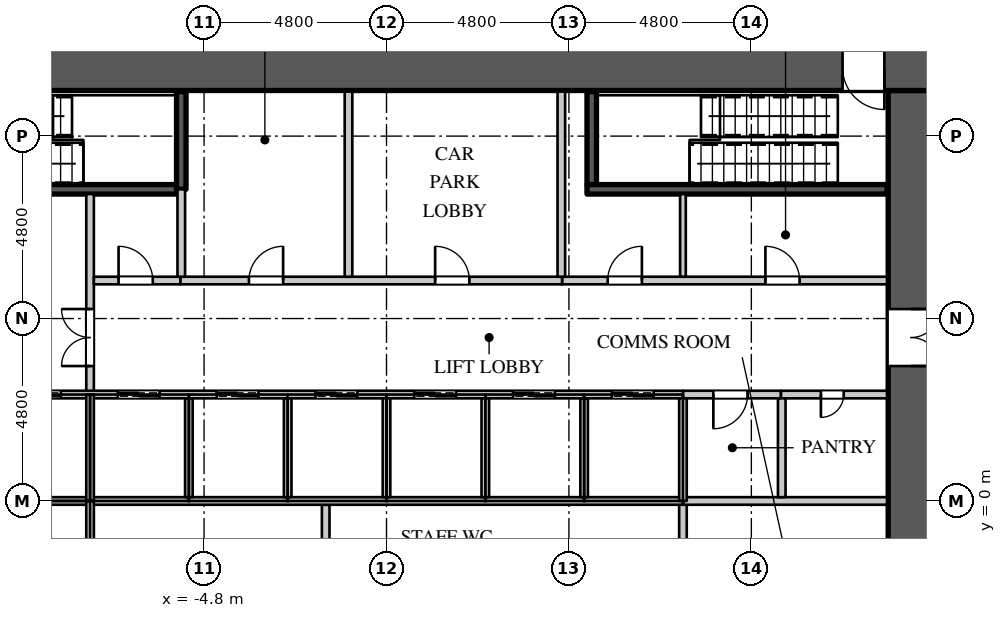
"""IFC4 building model, lengths in metres.
Left out: names, types, materials, properties, quantities, classifications, styles, units other than length and angle.
Written with IfcOpenShell. Run it as: python <this file> out.ifc"""

import sys

from ifc_helpers import new_model, si_unit, direction, frame, frame_2d, origin, place, context, subcontext, project, spatial, rectangle, extrude, element, fill, save


model = new_model("IFC4")
c1 = context("Model", 3, precision=1e-05, world=origin(), true_north=direction((0.0, 1.0)))
c2 = subcontext(c1, "Body", "Model", "MODEL_VIEW")
j1 = project(units=[si_unit("LENGTHUNIT", "METRE"), si_unit("PLANEANGLEUNIT", "RADIAN")], contexts=[c1])
p1 = place(None, origin())
s1 = spatial("IfcSite", under=j1, at=p1, CompositionType="ELEMENT")
p2 = place(p1, origin())
s2 = spatial("IfcBuilding", under=s1, at=p2, CompositionType="ELEMENT")
p3 = place(p2, frame((0.0, 0.0, -9.0)))
s3 = spatial("IfcBuildingStorey", under=s2, at=p3, CompositionType="ELEMENT", Elevation=-9.0)
p4 = place(p3, frame((-14.4, 11.4, 0.0), z_axis=(0.0, 0.0, 1.0), x_axis=(1.0, 0.0, 0.0)))
e1 = element("IfcWall", 1, at=p4, inside=s3, PredefinedType="SHEAR", context=c2, shape_type="SweptSolid", body=[
    extrude(rectangle(XDim=28.8, YDim=1.2, at=frame_2d((14.4, 0.0))), origin(), (0.0, 0.0, 1.0), 4.5),
])
p5 = place(p4, frame((1.3, 0.0, 0.0)))
e2 = element("IfcOpeningElement", 2, at=p5, cuts=e1, PredefinedType="OPENING", context=c2, shape_type="SweptSolid", body=[
    extrude(rectangle(XDim=1.1, YDim=2.2, at=frame_2d((0.55, 1.1))), frame((0.0, 0.61, 0.0), z_axis=(0.0, -1.0, 0.0), x_axis=(1.0, 0.0, 0.0)), (0.0, 0.0, 1.0), 1.22),
])
p6 = place(p4, frame((26.4, 0.0, 0.0)))
e3 = element("IfcOpeningElement", 3, at=p6, cuts=e1, PredefinedType="OPENING", context=c2, shape_type="SweptSolid", body=[
    extrude(rectangle(XDim=1.1, YDim=2.2, at=frame_2d((0.55, 1.1))), frame((0.0, 0.61, 0.0), z_axis=(0.0, -1.0, 0.0), x_axis=(1.0, 0.0, 0.0)), (0.0, 0.0, 1.0), 1.22),
])
p7 = place(p3, frame((13.8, -10.8, 0.0), z_axis=(0.0, 0.0, 1.0), x_axis=(0.0, 1.0, 0.0)))
e4 = element("IfcWall", 4, at=p7, inside=s3, PredefinedType="SHEAR", context=c2, shape_type="SweptSolid", body=[
    extrude(rectangle(XDim=21.6, YDim=1.2, at=frame_2d((10.8, 0.0))), origin(), (0.0, 0.0, 1.0), 4.5),
])
p8 = place(p7, frame((14.35, 0.0, 0.0)))
e5 = element("IfcOpeningElement", 5, at=p8, cuts=e4, PredefinedType="OPENING", context=c2, shape_type="SweptSolid", body=[
    extrude(rectangle(XDim=1.5, YDim=2.4, at=frame_2d((0.75, 1.2))), frame((0.0, 0.61, 0.0), z_axis=(0.0, -1.0, 0.0), x_axis=(1.0, 0.0, 0.0)), (0.0, 0.0, 1.0), 1.22),
])
p9 = place(p3, frame((-7.8, 2.8, 0.0), z_axis=(0.0, 0.0, 1.0), x_axis=(0.0, 1.0, 0.0)))
e6 = element("IfcWall", 6, at=p9, inside=s3, PredefinedType="PARTITIONING", context=c2, shape_type="SweptSolid", body=[
    extrude(rectangle(XDim=5.275, YDim=0.2, at=frame_2d((2.637, 0.0))), origin(), (0.0, 0.0, 1.0), 4.048),
])
p10 = place(p9, frame((0.75, 0.0, 0.0)))
e7 = element("IfcOpeningElement", 7, at=p10, cuts=e6, PredefinedType="OPENING", context=c2, shape_type="SweptSolid", body=[
    extrude(rectangle(XDim=1.5, YDim=2.4, at=frame_2d((0.75, 1.2))), frame((0.0, 0.11, 0.0), z_axis=(0.0, -1.0, 0.0), x_axis=(1.0, 0.0, 0.0)), (0.0, 0.0, 1.0), 0.22),
])
p11 = place(p3, frame((-7.7, 5.8, 0.0), z_axis=(0.0, 0.0, 1.0), x_axis=(1.0, 0.0, 0.0)))
e8 = element("IfcWall", 8, at=p11, inside=s3, PredefinedType="PARTITIONING", context=c2, shape_type="SweptSolid", body=[
    extrude(rectangle(XDim=2.28, YDim=0.2, at=frame_2d((1.14, 0.0))), origin(), (0.0, 0.0, 1.0), 4.048),
])
p12 = place(p11, frame((0.65, 0.0, 0.0)))
e9 = element("IfcOpeningElement", 9, at=p12, cuts=e8, PredefinedType="OPENING", context=c2, shape_type="SweptSolid", body=[
    extrude(rectangle(XDim=0.9, YDim=2.2, at=frame_2d((0.45, 1.1))), frame((0.0, 0.11, 0.0), z_axis=(0.0, -1.0, 0.0), x_axis=(1.0, 0.0, 0.0)), (0.0, 0.0, 1.0), 0.22),
])
p13 = place(p3, frame((4.62, 5.8, 0.0), z_axis=(0.0, 0.0, 1.0), x_axis=(1.0, 0.0, 0.0)))
e10 = element("IfcWall", 10, at=p13, inside=s3, PredefinedType="PARTITIONING", context=c2, shape_type="SweptSolid", body=[
    extrude(rectangle(XDim=8.55, YDim=0.2, at=frame_2d((4.275, 0.0))), origin(), (0.0, 0.0, 1.0), 4.048),
])
p14 = place(p13, frame((1.2, 0.0, 0.0)))
e11 = element("IfcOpeningElement", 11, at=p14, cuts=e10, PredefinedType="OPENING", context=c2, shape_type="SweptSolid", body=[
    extrude(rectangle(XDim=0.9, YDim=2.2, at=frame_2d((0.45, 1.1))), frame((0.0, 0.11, 0.0), z_axis=(0.0, -1.0, 0.0), x_axis=(1.0, 0.0, 0.0)), (0.0, 0.0, 1.0), 0.22),
])
p15 = place(p13, frame((5.35, 0.0, 0.0)))
e12 = element("IfcOpeningElement", 12, at=p15, cuts=e10, PredefinedType="OPENING", context=c2, shape_type="SweptSolid", body=[
    extrude(rectangle(XDim=0.9, YDim=2.2, at=frame_2d((0.45, 1.1))), frame((0.0, 0.11, 0.0), z_axis=(0.0, -1.0, 0.0), x_axis=(1.0, 0.0, 0.0)), (0.0, 0.0, 1.0), 0.22),
])
p16 = place(p3, frame((7.8, 2.8, 0.0), z_axis=(0.0, 0.0, 1.0), x_axis=(1.0, 0.0, 0.0)))
e13 = element("IfcWall", 13, at=p16, inside=s3, PredefinedType="PARTITIONING", context=c2, shape_type="SweptSolid", body=[
    extrude(rectangle(XDim=2.58, YDim=0.2, at=frame_2d((1.29, 0.0))), origin(), (0.0, 0.0, 1.0), 4.048),
])
p17 = place(p16, frame((0.8, 0.0, 0.0)))
e14 = element("IfcOpeningElement", 14, at=p17, cuts=e13, PredefinedType="OPENING", context=c2, shape_type="SweptSolid", body=[
    extrude(rectangle(XDim=0.9, YDim=2.2, at=frame_2d((0.45, 1.1))), frame((0.0, 0.11, 0.0), z_axis=(0.0, -1.0, 0.0), x_axis=(1.0, 0.0, 0.0)), (0.0, 0.0, 1.0), 0.22),
])
p18 = place(p3, frame((7.8, 5.9, 0.0), z_axis=(0.0, 0.0, 1.0), x_axis=(0.0, 1.0, 0.0)))
e15 = element("IfcWall", 15, at=p18, inside=s3, PredefinedType="PARTITIONING", context=c2, shape_type="SweptSolid", body=[
    extrude(rectangle(XDim=2.175, YDim=0.15, at=frame_2d((1.087, 0.0))), origin(), (0.0, 0.0, 1.0), 4.048),
])
p19 = place(p3, frame((-5.42, 5.8, 0.0), z_axis=(0.0, 0.0, 1.0), x_axis=(1.0, 0.0, 0.0)))
e16 = element("IfcWall", 16, at=p19, inside=s3, PredefinedType="PARTITIONING", context=c2, shape_type="SweptSolid", body=[
    extrude(rectangle(XDim=10.04, YDim=0.2, at=frame_2d((5.02, 0.0))), origin(), (0.0, 0.0, 1.0), 4.048),
])
p20 = place(p19, frame((1.8, 0.0, 0.0)))
e17 = element("IfcOpeningElement", 17, at=p20, cuts=e16, PredefinedType="OPENING", context=c2, shape_type="SweptSolid", body=[
    extrude(rectangle(XDim=0.9, YDim=2.2, at=frame_2d((0.45, 1.1))), frame((0.0, 0.11, 0.0), z_axis=(0.0, -1.0, 0.0), x_axis=(1.0, 0.0, 0.0)), (0.0, 0.0, 1.0), 0.22),
])
p21 = place(p19, frame((6.7, 0.0, 0.0)))
e18 = element("IfcOpeningElement", 18, at=p21, cuts=e16, PredefinedType="OPENING", context=c2, shape_type="SweptSolid", body=[
    extrude(rectangle(XDim=0.9, YDim=2.2, at=frame_2d((0.45, 1.1))), frame((0.0, 0.11, 0.0), z_axis=(0.0, -1.0, 0.0), x_axis=(1.0, 0.0, 0.0)), (0.0, 0.0, 1.0), 0.22),
])
p22 = place(p3, frame((-5.4, 5.9, 0.0), z_axis=(0.0, 0.0, 1.0), x_axis=(0.0, 1.0, 0.0)))
e19 = element("IfcWall", 19, at=p22, inside=s3, PredefinedType="PARTITIONING", context=c2, shape_type="SweptSolid", body=[
    extrude(rectangle(XDim=2.3, YDim=0.2, at=frame_2d((1.15, 0.0))), origin(), (0.0, 0.0, 1.0), 4.048),
])
p23 = place(p3, frame((-1.6, -2.7, 0.0), z_axis=(0.0, 0.0, 1.0), x_axis=(0.0, 1.0, 0.0)))
e20 = element("IfcWall", 20, at=p23, inside=s3, PredefinedType="PARTITIONING", context=c2, shape_type="SweptSolid", body=[
    extrude(rectangle(XDim=2.6, YDim=0.2, at=frame_2d((1.3, 0.0))), origin(), (0.0, 0.0, 1.0), 4.048),
])
for number, where, z_axis, x_axis in (
    (21, (-1.0, 5.9, 0.0), (0.0, 0.0, 1.0), (0.0, 1.0, 0.0)),
    (22, (4.6, 5.9, 0.0), (0.0, 0.0, 1.0), (0.0, 1.0, 0.0)),
):
    element("IfcWall", number, at=place(p3, frame(where, z_axis=z_axis, x_axis=x_axis)), inside=s3, PredefinedType="PARTITIONING", context=c2, shape_type="SweptSolid", body=[
        extrude(rectangle(XDim=4.87, YDim=0.2, at=frame_2d((2.435, 0.0))), origin(), (0.0, 0.0, 1.0), 4.048),
    ])
p24 = place(p3, frame((7.8, -2.7, 0.0), z_axis=(0.0, 0.0, 1.0), x_axis=(0.0, 1.0, 0.0)))
e23 = element("IfcWall", 23, at=p24, inside=s3, PredefinedType="PARTITIONING", context=c2, shape_type="SweptSolid", body=[
    extrude(rectangle(XDim=2.7, YDim=0.2, at=frame_2d((1.35, 0.0))), origin(), (0.0, 0.0, 1.0), 4.048),
])
p25 = place(p3, frame((7.8, 0.0, 0.0), z_axis=(0.0, 0.0, 1.0), x_axis=(1.0, 0.0, 0.0)))
e24 = element("IfcWall", 24, at=p25, inside=s3, PredefinedType="PARTITIONING", context=c2, shape_type="SweptSolid", body=[
    extrude(rectangle(XDim=5.37, YDim=0.2, at=frame_2d((2.685, 0.0))), origin(), (0.0, 0.0, 1.0), 4.048),
])
p26 = place(p3, frame((10.38, 2.8, 0.0), z_axis=(0.0, 0.0, 1.0), x_axis=(1.0, 0.0, 0.0)))
e25 = element("IfcWall", 25, at=p26, inside=s3, PredefinedType="PARTITIONING", context=c2, shape_type="SweptSolid", body=[
    extrude(rectangle(XDim=2.79, YDim=0.2, at=frame_2d((1.395, 0.0))), origin(), (0.0, 0.0, 1.0), 4.048),
])
p27 = place(p26, frame((1.05, 0.0, 0.0)))
e26 = element("IfcOpeningElement", 26, at=p27, cuts=e25, PredefinedType="OPENING", context=c2, shape_type="SweptSolid", body=[
    extrude(rectangle(XDim=0.6, YDim=2.0, at=frame_2d((0.3, 1.0))), frame((0.0, 0.11, 0.0), z_axis=(0.0, -1.0, 0.0), x_axis=(1.0, 0.0, 0.0)), (0.0, 0.0, 1.0), 0.22),
])
p28 = place(p3, frame((10.4, 0.1, 0.0), z_axis=(0.0, 0.0, 1.0), x_axis=(0.0, 1.0, 0.0)))
e27 = element("IfcWall", 27, at=p28, inside=s3, PredefinedType="PARTITIONING", context=c2, shape_type="SweptSolid", body=[
    extrude(rectangle(XDim=2.6, YDim=0.2, at=frame_2d((1.3, 0.0))), origin(), (0.0, 0.0, 1.0), 4.048),
])
p29 = place(p3, frame((-13.17, 0.0, 0.0), z_axis=(0.0, 0.0, 1.0), x_axis=(1.0, 0.0, 0.0)))
e28 = element("IfcWall", 28, at=p29, inside=s3, PredefinedType="PARTITIONING", context=c2, shape_type="SweptSolid", body=[
    extrude(rectangle(XDim=20.97, YDim=0.2, at=frame_2d((10.485, 0.0))), origin(), (0.0, 0.0, 1.0), 4.048),
])
p30 = place(p3, frame((-13.17, 2.8, 0.0), z_axis=(0.0, 0.0, 1.0), x_axis=(1.0, 0.0, 0.0)))
e29 = element("IfcWall", 29, at=p30, inside=s3, PredefinedType="PARTITIONING", context=c2, shape_type="SweptSolid", body=[
    extrude(rectangle(XDim=20.97, YDim=0.2, at=frame_2d((10.485, 0.0))), origin(), (0.0, 0.0, 1.0), 4.048),
])
p31 = place(p30, frame((0.8, 0.0, 0.0)))
e30 = element("IfcOpeningElement", 30, at=p31, cuts=e29, PredefinedType="OPENING", context=c2, shape_type="SweptSolid", body=[
    extrude(rectangle(XDim=1.1, YDim=2.2, at=frame_2d((0.55, 1.1))), frame((0.0, 0.11, 0.0), z_axis=(0.0, -1.0, 0.0), x_axis=(1.0, 0.0, 0.0)), (0.0, 0.0, 1.0), 0.22),
])
p32 = place(p30, frame((3.5, 0.0, 0.0)))
e31 = element("IfcOpeningElement", 31, at=p32, cuts=e29, PredefinedType="OPENING", context=c2, shape_type="SweptSolid", body=[
    extrude(rectangle(XDim=1.1, YDim=2.2, at=frame_2d((0.55, 1.1))), frame((0.0, 0.11, 0.0), z_axis=(0.0, -1.0, 0.0), x_axis=(1.0, 0.0, 0.0)), (0.0, 0.0, 1.0), 0.22),
])
p33 = place(p30, frame((6.1, 0.0, 0.0)))
e32 = element("IfcOpeningElement", 32, at=p33, cuts=e29, PredefinedType="OPENING", context=c2, shape_type="SweptSolid", body=[
    extrude(rectangle(XDim=1.1, YDim=2.2, at=frame_2d((0.55, 1.1))), frame((0.0, 0.11, 0.0), z_axis=(0.0, -1.0, 0.0), x_axis=(1.0, 0.0, 0.0)), (0.0, 0.0, 1.0), 0.22),
])
p34 = place(p30, frame((8.7, 0.0, 0.0)))
e33 = element("IfcOpeningElement", 33, at=p34, cuts=e29, PredefinedType="OPENING", context=c2, shape_type="SweptSolid", body=[
    extrude(rectangle(XDim=1.1, YDim=2.2, at=frame_2d((0.55, 1.1))), frame((0.0, 0.11, 0.0), z_axis=(0.0, -1.0, 0.0), x_axis=(1.0, 0.0, 0.0)), (0.0, 0.0, 1.0), 0.22),
])
p35 = place(p30, frame((11.3, 0.0, 0.0)))
e34 = element("IfcOpeningElement", 34, at=p35, cuts=e29, PredefinedType="OPENING", context=c2, shape_type="SweptSolid", body=[
    extrude(rectangle(XDim=1.1, YDim=2.2, at=frame_2d((0.55, 1.1))), frame((0.0, 0.11, 0.0), z_axis=(0.0, -1.0, 0.0), x_axis=(1.0, 0.0, 0.0)), (0.0, 0.0, 1.0), 0.22),
])
p36 = place(p30, frame((13.9, 0.0, 0.0)))
e35 = element("IfcOpeningElement", 35, at=p36, cuts=e29, PredefinedType="OPENING", context=c2, shape_type="SweptSolid", body=[
    extrude(rectangle(XDim=1.1, YDim=2.2, at=frame_2d((0.55, 1.1))), frame((0.0, 0.11, 0.0), z_axis=(0.0, -1.0, 0.0), x_axis=(1.0, 0.0, 0.0)), (0.0, 0.0, 1.0), 0.22),
])
p37 = place(p30, frame((16.5, 0.0, 0.0)))
e36 = element("IfcOpeningElement", 36, at=p37, cuts=e29, PredefinedType="OPENING", context=c2, shape_type="SweptSolid", body=[
    extrude(rectangle(XDim=1.1, YDim=2.2, at=frame_2d((0.55, 1.1))), frame((0.0, 0.11, 0.0), z_axis=(0.0, -1.0, 0.0), x_axis=(1.0, 0.0, 0.0)), (0.0, 0.0, 1.0), 0.22),
])
p38 = place(p30, frame((19.1, 0.0, 0.0)))
e37 = element("IfcOpeningElement", 37, at=p38, cuts=e29, PredefinedType="OPENING", context=c2, shape_type="SweptSolid", body=[
    extrude(rectangle(XDim=1.1, YDim=2.2, at=frame_2d((0.55, 1.1))), frame((0.0, 0.11, 0.0), z_axis=(0.0, -1.0, 0.0), x_axis=(1.0, 0.0, 0.0)), (0.0, 0.0, 1.0), 0.22),
])
for number, where, z_axis, x_axis in (
    (38, (-7.8, -2.8, 0.0), (0.0, 0.0, 1.0), (0.0, 1.0, 0.0)),
    (39, (-7.8, 0.0, 0.0), (0.0, 0.0, 1.0), (0.0, 1.0, 0.0)),
):
    element("IfcWall", number, at=place(p3, frame(where, z_axis=z_axis, x_axis=x_axis)), inside=s3, PredefinedType="PARTITIONING", context=c2, shape_type="SweptSolid", body=[
        extrude(rectangle(XDim=2.8, YDim=0.2, at=frame_2d((1.4, 0.0))), origin(), (0.0, 0.0, 1.0), 4.048),
    ])
for number, where, z_axis, x_axis in (
    (40, (-5.2, 0.1, 0.0), (0.0, 0.0, 1.0), (0.0, 1.0, 0.0)),
    (41, (-2.6, 0.1, 0.0), (0.0, 0.0, 1.0), (0.0, 1.0, 0.0)),
    (42, (0.0, 0.1, 0.0), (0.0, 0.0, 1.0), (0.0, 1.0, 0.0)),
    (43, (2.6, 0.1, 0.0), (0.0, 0.0, 1.0), (0.0, 1.0, 0.0)),
    (44, (5.2, 0.1, 0.0), (0.0, 0.0, 1.0), (0.0, 1.0, 0.0)),
):
    element("IfcWall", number, at=place(p3, frame(where, z_axis=z_axis, x_axis=x_axis)), inside=s3, PredefinedType="PARTITIONING", context=c2, shape_type="SweptSolid", body=[
        extrude(rectangle(XDim=2.6, YDim=0.2, at=frame_2d((1.3, 0.0))), origin(), (0.0, 0.0, 1.0), 4.048),
    ])
p39 = place(p3, frame((7.8, 0.0, 0.0), z_axis=(0.0, 0.0, 1.0), x_axis=(0.0, 1.0, 0.0)))
e45 = element("IfcWall", 45, at=p39, inside=s3, PredefinedType="PARTITIONING", context=c2, shape_type="SweptSolid", body=[
    extrude(rectangle(XDim=2.7, YDim=0.2, at=frame_2d((1.35, 0.0))), origin(), (0.0, 0.0, 1.0), 4.048),
])
p40 = place(p3, frame((-13.17, 8.2, 0.0), z_axis=(0.0, 0.0, 1.0), x_axis=(1.0, 0.0, 0.0)))
e46 = element("IfcWall", 46, at=p40, inside=s3, PredefinedType="SHEAR", context=c2, shape_type="SweptSolid", body=[
    extrude(rectangle(XDim=7.645, YDim=0.25, at=frame_2d((3.823, 0.0))), origin(), (0.0, 0.0, 1.0), 4.048),
])
p41 = place(p40, frame((0.15, 0.0, 0.0)))
e47 = element("IfcOpeningElement", 47, at=p41, cuts=e46, PredefinedType="OPENING", context=c2, shape_type="SweptSolid", body=[
    extrude(rectangle(XDim=1.1, YDim=2.2, at=frame_2d((0.55, 1.1))), frame((0.0, 0.135, 0.0), z_axis=(0.0, -1.0, 0.0), x_axis=(1.0, 0.0, 0.0)), (0.0, 0.0, 1.0), 0.27),
])
p42 = place(p3, frame((-5.4, 8.2, 0.0), z_axis=(0.0, 0.0, 1.0), x_axis=(0.0, 1.0, 0.0)))
e48 = element("IfcWall", 48, at=p42, inside=s3, PredefinedType="SHEAR", context=c2, shape_type="SweptSolid", body=[
    extrude(rectangle(XDim=2.57, YDim=0.25, at=frame_2d((1.285, 0.0))), origin(), (0.0, 0.0, 1.0), 4.048),
])
p43 = place(p3, frame((5.4, 8.325, 0.0), z_axis=(0.0, 0.0, 1.0), x_axis=(0.0, 1.0, 0.0)))
e49 = element("IfcWall", 49, at=p43, inside=s3, PredefinedType="SHEAR", context=c2, shape_type="SweptSolid", body=[
    extrude(rectangle(XDim=2.445, YDim=0.25, at=frame_2d((1.223, 0.0))), origin(), (0.0, 0.0, 1.0), 4.048),
])
p44 = place(p3, frame((5.275, 8.2, 0.0), z_axis=(0.0, 0.0, 1.0), x_axis=(1.0, 0.0, 0.0)))
e50 = element("IfcWall", 50, at=p44, inside=s3, PredefinedType="SHEAR", context=c2, shape_type="SweptSolid", body=[
    extrude(rectangle(XDim=7.895, YDim=0.25, at=frame_2d((3.948, 0.0))), origin(), (0.0, 0.0, 1.0), 4.048),
])
p45 = place(p27, origin())
e51 = element("IfcDoor", 51, at=p45, inside=s3, OperationType="SINGLE_SWING_RIGHT", PredefinedType="DOOR", context=c2, shape_type="SweptSolid", body=[
    extrude(rectangle(XDim=0.6, YDim=2.0, at=frame_2d((0.3, 1.0))), frame((0.0, 0.025, 0.0), z_axis=(0.0, -1.0, 0.0), x_axis=(1.0, 0.0, 0.0)), (0.0, 0.0, 1.0), 0.05),
])
fill(e26, e51)
p46 = place(p12, origin())
e52 = element("IfcDoor", 52, at=p46, inside=s3, OperationType="SINGLE_SWING_LEFT", PredefinedType="DOOR", context=c2, shape_type="SweptSolid", body=[
    extrude(rectangle(XDim=0.9, YDim=2.2, at=frame_2d((0.45, 1.1))), frame((0.0, 0.025, 0.0), z_axis=(0.0, -1.0, 0.0), x_axis=(1.0, 0.0, 0.0)), (0.0, 0.0, 1.0), 0.05),
])
fill(e9, e52)
p47 = place(p20, origin())
e53 = element("IfcDoor", 53, at=p47, inside=s3, OperationType="SINGLE_SWING_RIGHT", PredefinedType="DOOR", context=c2, shape_type="SweptSolid", body=[
    extrude(rectangle(XDim=0.9, YDim=2.2, at=frame_2d((0.45, 1.1))), frame((0.0, 0.025, 0.0), z_axis=(0.0, -1.0, 0.0), x_axis=(1.0, 0.0, 0.0)), (0.0, 0.0, 1.0), 0.05),
])
fill(e17, e53)
p48 = place(p21, origin())
e54 = element("IfcDoor", 54, at=p48, inside=s3, OperationType="SINGLE_SWING_LEFT", PredefinedType="DOOR", context=c2, shape_type="SweptSolid", body=[
    extrude(rectangle(XDim=0.9, YDim=2.2, at=frame_2d((0.45, 1.1))), frame((0.0, 0.025, 0.0), z_axis=(0.0, -1.0, 0.0), x_axis=(1.0, 0.0, 0.0)), (0.0, 0.0, 1.0), 0.05),
])
fill(e18, e54)
p49 = place(p14, origin())
e55 = element("IfcDoor", 55, at=p49, inside=s3, OperationType="SINGLE_SWING_RIGHT", PredefinedType="DOOR", context=c2, shape_type="SweptSolid", body=[
    extrude(rectangle(XDim=0.9, YDim=2.2, at=frame_2d((0.45, 1.1))), frame((0.0, 0.025, 0.0), z_axis=(0.0, -1.0, 0.0), x_axis=(1.0, 0.0, 0.0)), (0.0, 0.0, 1.0), 0.05),
])
fill(e11, e55)
p50 = place(p15, origin())
e56 = element("IfcDoor", 56, at=p50, inside=s3, OperationType="SINGLE_SWING_LEFT", PredefinedType="DOOR", context=c2, shape_type="SweptSolid", body=[
    extrude(rectangle(XDim=0.9, YDim=2.2, at=frame_2d((0.45, 1.1))), frame((0.0, 0.025, 0.0), z_axis=(0.0, -1.0, 0.0), x_axis=(1.0, 0.0, 0.0)), (0.0, 0.0, 1.0), 0.05),
])
fill(e12, e56)
p51 = place(p17, origin())
e57 = element("IfcDoor", 57, at=p51, inside=s3, OperationType="SINGLE_SWING_RIGHT", PredefinedType="DOOR", context=c2, shape_type="SweptSolid", body=[
    extrude(rectangle(XDim=0.9, YDim=2.2, at=frame_2d((0.45, 1.1))), frame((0.0, 0.025, 0.0), z_axis=(0.0, -1.0, 0.0), x_axis=(1.0, 0.0, 0.0)), (0.0, 0.0, 1.0), 0.05),
])
fill(e14, e57)
p52 = place(p32, origin())
e58 = element("IfcDoor", 58, at=p52, inside=s3, OperationType="DOUBLE_DOOR_SLIDING", PredefinedType="DOOR", context=c2, shape_type="SweptSolid", body=[
    extrude(rectangle(XDim=1.1, YDim=2.2, at=frame_2d((0.55, 1.1))), frame((0.0, 0.025, 0.0), z_axis=(0.0, -1.0, 0.0), x_axis=(1.0, 0.0, 0.0)), (0.0, 0.0, 1.0), 0.05),
])
fill(e31, e58)
p53 = place(p33, origin())
e59 = element("IfcDoor", 59, at=p53, inside=s3, OperationType="DOUBLE_DOOR_SLIDING", PredefinedType="DOOR", context=c2, shape_type="SweptSolid", body=[
    extrude(rectangle(XDim=1.1, YDim=2.2, at=frame_2d((0.55, 1.1))), frame((0.0, 0.025, 0.0), z_axis=(0.0, -1.0, 0.0), x_axis=(1.0, 0.0, 0.0)), (0.0, 0.0, 1.0), 0.05),
])
fill(e32, e59)
p54 = place(p34, origin())
e60 = element("IfcDoor", 60, at=p54, inside=s3, OperationType="DOUBLE_DOOR_SLIDING", PredefinedType="DOOR", context=c2, shape_type="SweptSolid", body=[
    extrude(rectangle(XDim=1.1, YDim=2.2, at=frame_2d((0.55, 1.1))), frame((0.0, 0.025, 0.0), z_axis=(0.0, -1.0, 0.0), x_axis=(1.0, 0.0, 0.0)), (0.0, 0.0, 1.0), 0.05),
])
fill(e33, e60)
p55 = place(p35, origin())
e61 = element("IfcDoor", 61, at=p55, inside=s3, OperationType="DOUBLE_DOOR_SLIDING", PredefinedType="DOOR", context=c2, shape_type="SweptSolid", body=[
    extrude(rectangle(XDim=1.1, YDim=2.2, at=frame_2d((0.55, 1.1))), frame((0.0, 0.025, 0.0), z_axis=(0.0, -1.0, 0.0), x_axis=(1.0, 0.0, 0.0)), (0.0, 0.0, 1.0), 0.05),
])
fill(e34, e61)
p56 = place(p36, origin())
e62 = element("IfcDoor", 62, at=p56, inside=s3, OperationType="DOUBLE_DOOR_SLIDING", PredefinedType="DOOR", context=c2, shape_type="SweptSolid", body=[
    extrude(rectangle(XDim=1.1, YDim=2.2, at=frame_2d((0.55, 1.1))), frame((0.0, 0.025, 0.0), z_axis=(0.0, -1.0, 0.0), x_axis=(1.0, 0.0, 0.0)), (0.0, 0.0, 1.0), 0.05),
])
fill(e35, e62)
p57 = place(p37, origin())
e63 = element("IfcDoor", 63, at=p57, inside=s3, OperationType="DOUBLE_DOOR_SLIDING", PredefinedType="DOOR", context=c2, shape_type="SweptSolid", body=[
    extrude(rectangle(XDim=1.1, YDim=2.2, at=frame_2d((0.55, 1.1))), frame((0.0, 0.025, 0.0), z_axis=(0.0, -1.0, 0.0), x_axis=(1.0, 0.0, 0.0)), (0.0, 0.0, 1.0), 0.05),
])
fill(e36, e63)
p58 = place(p38, origin())
e64 = element("IfcDoor", 64, at=p58, inside=s3, OperationType="DOUBLE_DOOR_SLIDING", PredefinedType="DOOR", context=c2, shape_type="SweptSolid", body=[
    extrude(rectangle(XDim=1.1, YDim=2.2, at=frame_2d((0.55, 1.1))), frame((0.0, 0.025, 0.0), z_axis=(0.0, -1.0, 0.0), x_axis=(1.0, 0.0, 0.0)), (0.0, 0.0, 1.0), 0.05),
])
fill(e37, e64)
p59 = place(p10, origin())
e65 = element("IfcDoor", 65, at=p59, inside=s3, OperationType="DOUBLE_DOOR_SINGLE_SWING", PredefinedType="DOOR", context=c2, shape_type="SweptSolid", body=[
    extrude(rectangle(XDim=1.5, YDim=2.4, at=frame_2d((0.75, 1.2))), frame((0.0, 0.025, 0.0), z_axis=(0.0, -1.0, 0.0), x_axis=(1.0, 0.0, 0.0)), (0.0, 0.0, 1.0), 0.05),
])
fill(e7, e65)
p60 = place(p8, origin())
e66 = element("IfcDoor", 66, at=p60, inside=s3, OperationType="DOUBLE_DOOR_SINGLE_SWING", PredefinedType="DOOR", context=c2, shape_type="SweptSolid", body=[
    extrude(rectangle(XDim=1.5, YDim=2.4, at=frame_2d((0.75, 1.2))), frame((0.0, 0.025, 0.0), z_axis=(0.0, -1.0, 0.0), x_axis=(1.0, 0.0, 0.0)), (0.0, 0.0, 1.0), 0.05),
])
fill(e5, e66)
p61 = place(p6, origin())
e67 = element("IfcDoor", 67, at=p61, inside=s3, OperationType="SINGLE_SWING_LEFT", PredefinedType="DOOR", context=c2, shape_type="SweptSolid", body=[
    extrude(rectangle(XDim=1.1, YDim=2.2, at=frame_2d((0.55, 1.1))), frame((0.0, 0.025, 0.0), z_axis=(0.0, -1.0, 0.0), x_axis=(1.0, 0.0, 0.0)), (0.0, 0.0, 1.0), 0.05),
])
fill(e3, e67)
save(model, sys.argv[1])
